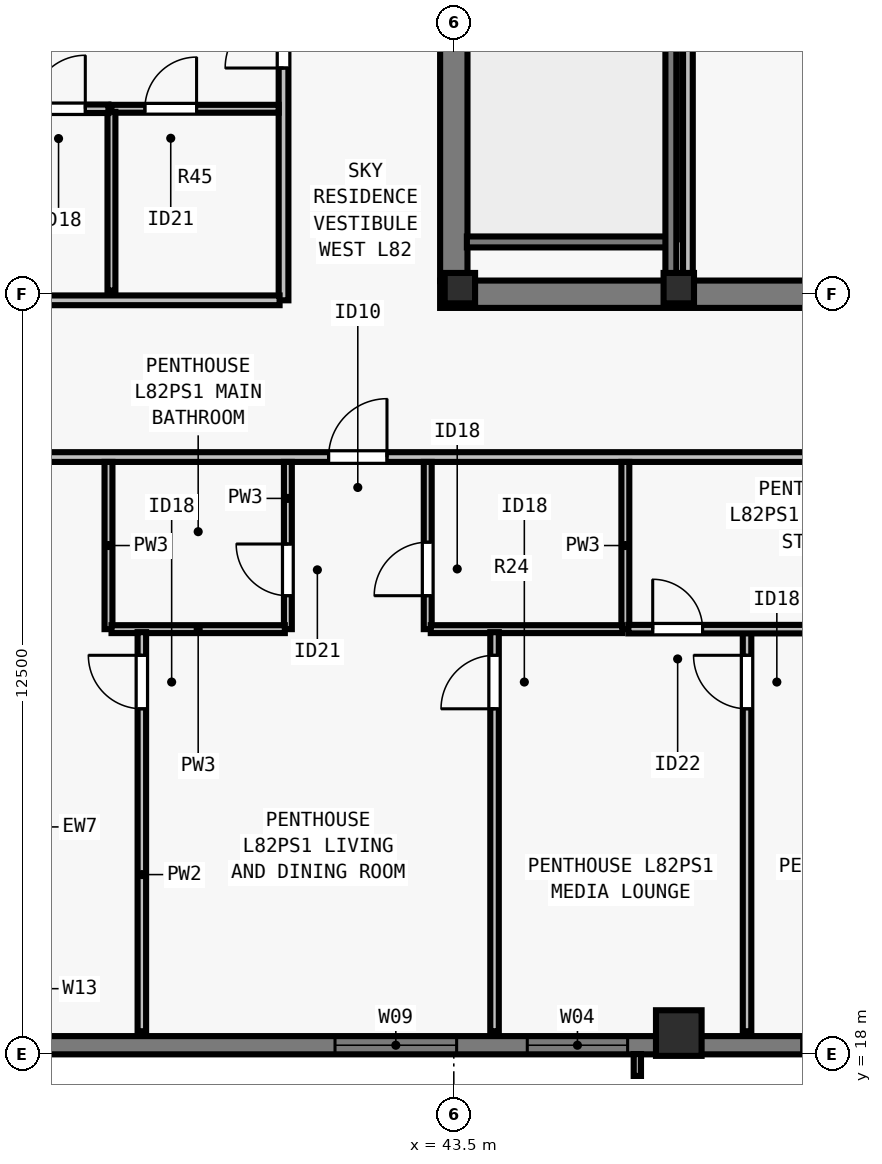
"""IFC4 building model, lengths in metres.
Left out: names, types, materials, properties, quantities, classifications, styles, units other than length and angle.
Written with IfcOpenShell. Run it as: python <this file> out.ifc"""

import sys

from ifc_helpers import new_model, si_unit, direction, frame, frame_2d, origin, origin_2d, place, context, subcontext, project, spatial, rectangle, i_section, extrude, element, fill, save


model = new_model("IFC4")
c1 = context("Model", 3, precision=1e-05, world=origin(), true_north=direction((0.0, 1.0)))
c2 = subcontext(c1, "Body", "Model", "MODEL_VIEW")
j1 = project(units=[si_unit("LENGTHUNIT", "METRE"), si_unit("PLANEANGLEUNIT", "RADIAN")], contexts=[c1])
p1 = place(None, origin())
s1 = spatial("IfcSite", under=j1, at=p1, CompositionType="ELEMENT")
p2 = place(p1, origin())
s2 = spatial("IfcBuilding", under=s1, at=p2, CompositionType="ELEMENT")
p3 = place(p2, frame((0.0, 0.0, 298.0)))
s3 = spatial("IfcBuildingStorey", under=s2, at=p3, CompositionType="ELEMENT", Elevation=298.0)
for number, where, z_axis, x_axis in (
    (1, (43.6, 30.6, 0.0), (0.0, 0.0, 1.0), (1.0, 0.0, 0.0)),
    (2, (47.2, 30.6, 0.0), (0.0, 0.0, 1.0), (1.0, 0.0, 0.0)),
):
    element("IfcColumn", number, at=place(p3, frame(where, z_axis=z_axis, x_axis=x_axis)), inside=s3, PredefinedType="COLUMN", context=c2, shape_type="SweptSolid", body=[
        extrude(i_section(OverallWidth=0.5, OverallDepth=0.5, WebThickness=0.028, FlangeThickness=0.045, at=origin_2d()), origin(), (0.0, 0.0, 1.0), 3.5),
    ])
p4 = place(p3, frame((47.2, 18.35, 0.0), z_axis=(0.0, 0.0, 1.0), x_axis=(1.0, 0.0, 0.0)))
e3 = element("IfcColumn", 3, at=p4, inside=s3, PredefinedType="COLUMN", context=c2, shape_type="SweptSolid", body=[
    extrude(rectangle(XDim=0.75, YDim=0.75, at=origin_2d()), origin(), (0.0, 0.0, 1.0), 3.5),
])
p5 = place(p3, frame((67.5, 18.15, 0.0), z_axis=(0.0, 0.0, 1.0), x_axis=(-1.0, 0.0, 0.0)))
e4 = element("IfcWall", 4, at=p5, inside=s3, PredefinedType="SOLIDWALL", context=c2, shape_type="SweptSolid", body=[
    extrude(rectangle(XDim=30.722, YDim=0.3, at=frame_2d((15.361, 0.0))), origin(), (0.0, 0.0, 1.0), 3.29),
])
p6 = place(p5, frame((4.944, 0.0, 0.8)))
e5 = element("IfcOpeningElement", 5, at=p6, cuts=e4, PredefinedType="OPENING", context=c2, shape_type="SweptSolid", body=[
    extrude(rectangle(XDim=1.65, YDim=1.758, at=frame_2d((0.825, 0.879))), frame((0.0, 0.16, 0.0), z_axis=(0.0, -1.0, 0.0), x_axis=(1.0, 0.0, 0.0)), (0.0, 0.0, 1.0), 0.32),
])
p7 = place(p5, frame((7.756, 0.0, 0.8)))
e6 = element("IfcOpeningElement", 6, at=p7, cuts=e4, PredefinedType="OPENING", context=c2, shape_type="SweptSolid", body=[
    extrude(rectangle(XDim=2.0, YDim=1.758, at=frame_2d((1.0, 0.879))), frame((0.0, 0.16, 0.0), z_axis=(0.0, -1.0, 0.0), x_axis=(1.0, 0.0, 0.0)), (0.0, 0.0, 1.0), 0.32),
])
p8 = place(p5, frame((12.617, 0.0, 0.8)))
e7 = element("IfcOpeningElement", 7, at=p8, cuts=e4, PredefinedType="OPENING", context=c2, shape_type="SweptSolid", body=[
    extrude(rectangle(XDim=1.65, YDim=1.758, at=frame_2d((0.825, 0.879))), frame((0.0, 0.16, 0.0), z_axis=(0.0, -1.0, 0.0), x_axis=(1.0, 0.0, 0.0)), (0.0, 0.0, 1.0), 0.32),
])
p9 = place(p5, frame((16.28, 0.0, 0.8)))
e8 = element("IfcOpeningElement", 8, at=p9, cuts=e4, PredefinedType="OPENING", context=c2, shape_type="SweptSolid", body=[
    extrude(rectangle(XDim=2.0, YDim=1.758, at=frame_2d((1.0, 0.879))), frame((0.0, 0.16, 0.0), z_axis=(0.0, -1.0, 0.0), x_axis=(1.0, 0.0, 0.0)), (0.0, 0.0, 1.0), 0.32),
])
p10 = place(p5, frame((21.142, 0.0, 0.8)))
e9 = element("IfcOpeningElement", 9, at=p10, cuts=e4, PredefinedType="OPENING", context=c2, shape_type="SweptSolid", body=[
    extrude(rectangle(XDim=1.65, YDim=1.758, at=frame_2d((0.825, 0.879))), frame((0.0, 0.16, 0.0), z_axis=(0.0, -1.0, 0.0), x_axis=(1.0, 0.0, 0.0)), (0.0, 0.0, 1.0), 0.32),
])
p11 = place(p5, frame((23.954, 0.0, 0.8)))
e10 = element("IfcOpeningElement", 10, at=p11, cuts=e4, PredefinedType="OPENING", context=c2, shape_type="SweptSolid", body=[
    extrude(rectangle(XDim=2.0, YDim=1.758, at=frame_2d((1.0, 0.879))), frame((0.0, 0.16, 0.0), z_axis=(0.0, -1.0, 0.0), x_axis=(1.0, 0.0, 0.0)), (0.0, 0.0, 1.0), 0.32),
])
p12 = place(p3, frame((43.275, 30.5, 0.0), z_axis=(0.0, 0.0, 1.0), x_axis=(1.0, 0.0, 0.0)))
e11 = element("IfcWall", 11, at=p12, inside=s3, PredefinedType="SHEAR", context=c2, shape_type="SweptSolid", body=[
    extrude(rectangle(XDim=17.45, YDim=0.45, at=frame_2d((8.725, 0.0))), origin(), (0.0, 0.0, 1.0), 3.29),
])
p13 = place(p3, frame((43.5, 30.715, 0.0), z_axis=(0.0, 0.0, 1.0), x_axis=(0.0, 1.0, 0.0)))
e12 = element("IfcWall", 12, at=p13, inside=s3, PredefinedType="SHEAR", context=c2, shape_type="SweptSolid", body=[
    extrude(rectangle(XDim=8.035, YDim=0.45, at=frame_2d((4.018, 0.0))), origin(), (0.0, 0.0, 1.0), 3.29),
])
p14 = place(p3, frame((47.35, 30.71, 0.0), z_axis=(0.0, 0.0, 1.0), x_axis=(0.0, 1.0, 0.0)))
e13 = element("IfcWall", 13, at=p14, inside=s3, PredefinedType="PARTITIONING", context=c2, shape_type="SweptSolid", body=[
    extrude(rectangle(XDim=7.905, YDim=0.16, at=frame_2d((3.953, 0.0))), origin(), (0.0, 0.0, 1.0), 3.29),
])
p15 = place(p3, frame((31.285, 27.823, 0.0), z_axis=(0.0, 0.0, 1.0), x_axis=(1.0, 0.0, 0.0)))
e14 = element("IfcWall", 14, at=p15, inside=s3, PredefinedType="PARTITIONING", context=c2, shape_type="SweptSolid", body=[
    extrude(rectangle(XDim=41.43, YDim=0.16, at=frame_2d((20.715, 0.0))), origin(), (0.0, 0.0, 1.0), 3.009),
])
p16 = place(p15, frame((10.156, 0.0, 0.0)))
e15 = element("IfcOpeningElement", 15, at=p16, cuts=e14, PredefinedType="OPENING", context=c2, shape_type="SweptSolid", body=[
    extrude(rectangle(XDim=0.96, YDim=2.18, at=frame_2d((0.48, 1.09))), frame((0.0, 0.09, 0.0), z_axis=(0.0, -1.0, 0.0), x_axis=(1.0, 0.0, 0.0)), (0.0, 0.0, 1.0), 0.18),
])
p17 = place(p15, frame((30.736, 0.0, 0.0)))
e16 = element("IfcOpeningElement", 16, at=p17, cuts=e14, PredefinedType="OPENING", context=c2, shape_type="SweptSolid", body=[
    extrude(rectangle(XDim=0.96, YDim=2.18, at=frame_2d((0.48, 1.09))), frame((0.0, 0.09, 0.0), z_axis=(0.0, -1.0, 0.0), x_axis=(1.0, 0.0, 0.0)), (0.0, 0.0, 1.0), 0.18),
])
p18 = place(p3, frame((40.7, 30.4, 0.0), z_axis=(0.0, 0.0, 1.0), x_axis=(0.0, 1.0, 0.0)))
e17 = element("IfcWall", 17, at=p18, inside=s3, PredefinedType="PARTITIONING", context=c2, shape_type="SweptSolid", body=[
    extrude(rectangle(XDim=17.2, YDim=0.16, at=frame_2d((8.6, 0.0))), origin(), (0.0, 0.0, 1.0), 3.009),
])
p19 = place(p18, frame((3.82, 0.0, 0.0)))
e18 = element("IfcOpeningElement", 18, at=p19, cuts=e17, PredefinedType="OPENING", context=c2, shape_type="SweptSolid", body=[
    extrude(rectangle(XDim=0.96, YDim=2.18, at=frame_2d((0.48, 1.09))), frame((0.0, 0.09, 0.0), z_axis=(0.0, -1.0, 0.0), x_axis=(1.0, 0.0, 0.0)), (0.0, 0.0, 1.0), 0.18),
])
p20 = place(p18, frame((12.42, 0.0, 0.0)))
e19 = element("IfcOpeningElement", 19, at=p20, cuts=e17, PredefinedType="OPENING", context=c2, shape_type="SweptSolid", body=[
    extrude(rectangle(XDim=0.96, YDim=2.18, at=frame_2d((0.48, 1.09))), frame((0.0, 0.09, 0.0), z_axis=(0.0, -1.0, 0.0), x_axis=(1.0, 0.0, 0.0)), (0.0, 0.0, 1.0), 0.18),
])
p21 = place(p3, frame((31.285, 30.4, 0.0), z_axis=(0.0, 0.0, 1.0), x_axis=(1.0, 0.0, 0.0)))
e20 = element("IfcWall", 20, at=p21, inside=s3, PredefinedType="PARTITIONING", context=c2, shape_type="SweptSolid", body=[
    extrude(rectangle(XDim=9.35, YDim=0.16, at=frame_2d((4.675, 0.0))), origin(), (0.0, 0.0, 1.0), 3.29),
])
p22 = place(p3, frame((37.821, 24.992, 0.0), z_axis=(0.0, 0.0, 1.0), x_axis=(0.0, 1.0, 0.0)))
e21 = element("IfcWall", 21, at=p22, inside=s3, PredefinedType="PLUMBINGWALL", context=c2, shape_type="SweptSolid", body=[
    extrude(rectangle(XDim=2.75, YDim=0.13, at=frame_2d((1.375, 0.0))), origin(), (0.0, 0.0, 1.0), 3.29),
])
p23 = place(p3, frame((40.771, 24.992, 0.0), z_axis=(0.0, 0.0, 1.0), x_axis=(0.0, 1.0, 0.0)))
e22 = element("IfcWall", 22, at=p23, inside=s3, PredefinedType="PLUMBINGWALL", context=c2, shape_type="SweptSolid", body=[
    extrude(rectangle(XDim=2.75, YDim=0.13, at=frame_2d((1.375, 0.0))), origin(), (0.0, 0.0, 1.0), 2.653),
])
p24 = place(p23, frame((0.55, 0.0, 0.0)))
e23 = element("IfcOpeningElement", 23, at=p24, cuts=e22, PredefinedType="OPENING", context=c2, shape_type="SweptSolid", body=[
    extrude(rectangle(XDim=0.85, YDim=2.08, at=frame_2d((0.425, 1.04))), frame((0.0, 0.075, 0.0), z_axis=(0.0, -1.0, 0.0), x_axis=(1.0, 0.0, 0.0)), (0.0, 0.0, 1.0), 0.15),
])
p25 = place(p3, frame((37.871, 24.992, 0.0), z_axis=(0.0, 0.0, 1.0), x_axis=(1.0, 0.0, 0.0)))
e24 = element("IfcWall", 24, at=p25, inside=s3, PredefinedType="PLUMBINGWALL", context=c2, shape_type="SweptSolid", body=[
    extrude(rectangle(XDim=2.85, YDim=0.13, at=frame_2d((1.425, 0.0))), origin(), (0.0, 0.0, 1.0), 3.29),
])
p26 = place(p3, frame((46.321, 24.992, 0.0), z_axis=(0.0, 0.0, 1.0), x_axis=(0.0, 1.0, 0.0)))
e25 = element("IfcWall", 25, at=p26, inside=s3, PredefinedType="PLUMBINGWALL", context=c2, shape_type="SweptSolid", body=[
    extrude(rectangle(XDim=2.75, YDim=0.13, at=frame_2d((1.375, 0.0))), origin(), (0.0, 0.0, 1.0), 3.29),
])
p27 = place(p3, frame((43.071, 24.992, 0.0), z_axis=(0.0, 0.0, 1.0), x_axis=(0.0, 1.0, 0.0)))
e26 = element("IfcWall", 26, at=p27, inside=s3, PredefinedType="PLUMBINGWALL", context=c2, shape_type="SweptSolid", body=[
    extrude(rectangle(XDim=2.75, YDim=0.13, at=frame_2d((1.375, 0.0))), origin(), (0.0, 0.0, 1.0), 3.29),
])
p28 = place(p27, frame((0.55, 0.0, 0.0)))
e27 = element("IfcOpeningElement", 27, at=p28, cuts=e26, PredefinedType="OPENING", context=c2, shape_type="SweptSolid", body=[
    extrude(rectangle(XDim=0.88, YDim=2.1, at=frame_2d((0.44, 1.05))), frame((0.0, 0.075, 0.0), z_axis=(0.0, -1.0, 0.0), x_axis=(1.0, 0.0, 0.0)), (0.0, 0.0, 1.0), 0.15),
])
p29 = place(p3, frame((43.121, 24.992, 0.0), z_axis=(0.0, 0.0, 1.0), x_axis=(1.0, 0.0, 0.0)))
e28 = element("IfcWall", 28, at=p29, inside=s3, PredefinedType="PLUMBINGWALL", context=c2, shape_type="SweptSolid", body=[
    extrude(rectangle(XDim=3.15, YDim=0.13, at=frame_2d((1.575, 0.0))), origin(), (0.0, 0.0, 1.0), 3.29),
])
p30 = place(p3, frame((38.37, 18.38, 0.0), z_axis=(0.0, 0.0, 1.0), x_axis=(0.0, 1.0, 0.0)))
e29 = element("IfcWall", 29, at=p30, inside=s3, PredefinedType="PARTITIONING", context=c2, shape_type="SweptSolid", body=[
    extrude(rectangle(XDim=6.562, YDim=0.14, at=frame_2d((3.281, 0.0))), origin(), (0.0, 0.0, 1.0), 2.653),
])
p31 = place(p30, frame((5.302, 0.0, 0.0)))
e30 = element("IfcOpeningElement", 30, at=p31, cuts=e29, PredefinedType="OPENING", context=c2, shape_type="SweptSolid", body=[
    extrude(rectangle(XDim=0.88, YDim=2.1, at=frame_2d((0.44, 1.05))), frame((0.0, 0.08, 0.0), z_axis=(0.0, -1.0, 0.0), x_axis=(1.0, 0.0, 0.0)), (0.0, 0.0, 1.0), 0.16),
])
p32 = place(p3, frame((48.323, 18.38, 0.0), z_axis=(0.0, 0.0, 1.0), x_axis=(0.0, 1.0, 0.0)))
e31 = element("IfcWall", 31, at=p32, inside=s3, PredefinedType="PARTITIONING", context=c2, shape_type="SweptSolid", body=[
    extrude(rectangle(XDim=6.653, YDim=0.14, at=frame_2d((3.326, 0.0))), origin(), (0.0, 0.0, 1.0), 3.009),
])
p33 = place(p32, frame((5.302, 0.0, 0.0)))
e32 = element("IfcOpeningElement", 32, at=p33, cuts=e31, PredefinedType="OPENING", context=c2, shape_type="SweptSolid", body=[
    extrude(rectangle(XDim=0.88, YDim=2.1, at=frame_2d((0.44, 1.05))), frame((0.0, 0.08, 0.0), z_axis=(0.0, -1.0, 0.0), x_axis=(1.0, 0.0, 0.0)), (0.0, 0.0, 1.0), 0.16),
])
p34 = place(p3, frame((46.371, 24.992, 0.0), z_axis=(0.0, 0.0, 1.0), x_axis=(1.0, 0.0, 0.0)))
e33 = element("IfcWall", 33, at=p34, inside=s3, PredefinedType="PARTITIONING", context=c2, shape_type="SweptSolid", body=[
    extrude(rectangle(XDim=6.101, YDim=0.14, at=frame_2d((3.051, 0.0))), origin(), (0.0, 0.0, 1.0), 3.29),
])
p35 = place(p34, frame((0.4, 0.0, 0.0)))
e34 = element("IfcOpeningElement", 34, at=p35, cuts=e33, PredefinedType="OPENING", context=c2, shape_type="SweptSolid", body=[
    extrude(rectangle(XDim=0.82, YDim=2.1, at=frame_2d((0.41, 1.05))), frame((0.0, 0.08, 0.0), z_axis=(0.0, -1.0, 0.0), x_axis=(1.0, 0.0, 0.0)), (0.0, 0.0, 1.0), 0.16),
])
p36 = place(p3, frame((44.17, 18.38, 0.0), z_axis=(0.0, 0.0, 1.0), x_axis=(0.0, 1.0, 0.0)))
e35 = element("IfcWall", 35, at=p36, inside=s3, PredefinedType="PARTITIONING", context=c2, shape_type="SweptSolid", body=[
    extrude(rectangle(XDim=6.562, YDim=0.14, at=frame_2d((3.281, 0.0))), origin(), (0.0, 0.0, 1.0), 3.29),
])
p37 = place(p36, frame((5.302, 0.0, 0.0)))
e36 = element("IfcOpeningElement", 36, at=p37, cuts=e35, PredefinedType="OPENING", context=c2, shape_type="SweptSolid", body=[
    extrude(rectangle(XDim=0.88, YDim=2.1, at=frame_2d((0.44, 1.05))), frame((0.0, 0.08, 0.0), z_axis=(0.0, -1.0, 0.0), x_axis=(1.0, 0.0, 0.0)), (0.0, 0.0, 1.0), 0.16),
])
p38 = place(p3, frame((37.87, 33.55, 0.0), z_axis=(0.0, 0.0, 1.0), x_axis=(1.0, 0.0, 0.0)))
e37 = element("IfcWall", 37, at=p38, inside=s3, PredefinedType="PLUMBINGWALL", context=c2, shape_type="SweptSolid", body=[
    extrude(rectangle(XDim=2.75, YDim=0.13, at=frame_2d((1.375, 0.0))), origin(), (0.0, 0.0, 1.0), 3.29),
])
p39 = place(p38, frame((0.55, 0.0, 0.0)))
e38 = element("IfcOpeningElement", 38, at=p39, cuts=e37, PredefinedType="OPENING", context=c2, shape_type="SweptSolid", body=[
    extrude(rectangle(XDim=0.85, YDim=2.08, at=frame_2d((0.425, 1.04))), frame((0.0, 0.075, 0.0), z_axis=(0.0, -1.0, 0.0), x_axis=(1.0, 0.0, 0.0)), (0.0, 0.0, 1.0), 0.15),
])
p40 = place(p3, frame((37.87, 30.56, 0.0), z_axis=(0.0, 0.0, 1.0), x_axis=(0.0, 1.0, 0.0)))
e39 = element("IfcWall", 39, at=p40, inside=s3, PredefinedType="PLUMBINGWALL", context=c2, shape_type="SweptSolid", body=[
    extrude(rectangle(XDim=2.94, YDim=0.13, at=frame_2d((1.47, 0.0))), origin(), (0.0, 0.0, 1.0), 3.29),
])
p41 = place(p3, frame((31.38, 33.55, 0.0), z_axis=(0.0, 0.0, 1.0), x_axis=(1.0, 0.0, 0.0)))
e40 = element("IfcWall", 40, at=p41, inside=s3, PredefinedType="PARTITIONING", context=c2, shape_type="SweptSolid", body=[
    extrude(rectangle(XDim=6.44, YDim=0.14, at=frame_2d((3.22, 0.0))), origin(), (0.0, 0.0, 1.0), 2.653),
])
p42 = place(p41, frame((5.18, 0.0, 0.0)))
e41 = element("IfcOpeningElement", 41, at=p42, cuts=e40, PredefinedType="OPENING", context=c2, shape_type="SweptSolid", body=[
    extrude(rectangle(XDim=0.88, YDim=2.1, at=frame_2d((0.44, 1.05))), frame((0.0, 0.08, 0.0), z_axis=(0.0, -1.0, 0.0), x_axis=(1.0, 0.0, 0.0)), (0.0, 0.0, 1.0), 0.16),
])
p43 = place(p3, frame((43.715, 31.36, 0.0), z_axis=(0.0, 0.0, 1.0), x_axis=(1.0, 0.0, 0.0)))
e42 = element("IfcWall", 42, at=p43, inside=s3, PredefinedType="SOLIDWALL", context=c2, shape_type="SweptSolid", body=[
    extrude(rectangle(XDim=3.28, YDim=0.18, at=frame_2d((1.64, 0.0))), origin(), (0.0, 0.0, 1.0), 3.29),
])
p44 = place(p3, frame((47.07, 38.78, 0.0), z_axis=(0.0, 0.0, 1.0), x_axis=(0.0, -1.0, 0.0)))
e43 = element("IfcWall", 43, at=p44, inside=s3, PredefinedType="SOLIDWALL", context=c2, shape_type="SweptSolid", body=[
    extrude(rectangle(XDim=8.067, YDim=0.18, at=frame_2d((4.034, 0.0))), origin(), (0.0, 0.0, 1.0), 3.29),
])
p45 = place(p9, origin())
e44 = element("IfcWindow", 44, at=p45, inside=s3, PartitioningType="SINGLE_PANEL", PredefinedType="WINDOW", context=c2, shape_type="SweptSolid", body=[
    extrude(rectangle(XDim=2.0, YDim=1.758, at=frame_2d((1.0, 0.879))), frame((0.0, -0.05, 0.0), z_axis=(0.0, -1.0, 0.0), x_axis=(1.0, 0.0, 0.0)), (0.0, 0.0, 1.0), 0.06),
])
fill(e8, e44)
p46 = place(p10, origin())
e45 = element("IfcWindow", 45, at=p46, inside=s3, PartitioningType="SINGLE_PANEL", PredefinedType="WINDOW", context=c2, shape_type="SweptSolid", body=[
    extrude(rectangle(XDim=1.65, YDim=1.758, at=frame_2d((0.825, 0.879))), frame((0.0, -0.05, 0.0), z_axis=(0.0, -1.0, 0.0), x_axis=(1.0, 0.0, 0.0)), (0.0, 0.0, 1.0), 0.06),
])
fill(e9, e45)
p47 = place(p11, origin())
e46 = element("IfcWindow", 46, at=p47, inside=s3, PartitioningType="SINGLE_PANEL", PredefinedType="WINDOW", context=c2, shape_type="SweptSolid", body=[
    extrude(rectangle(XDim=2.0, YDim=1.758, at=frame_2d((1.0, 0.879))), frame((0.0, -0.05, 0.0), z_axis=(0.0, -1.0, 0.0), x_axis=(1.0, 0.0, 0.0)), (0.0, 0.0, 1.0), 0.06),
])
fill(e10, e46)
p48 = place(p24, origin())
e47 = element("IfcDoor", 47, at=p48, inside=s3, OperationType="SINGLE_SWING_RIGHT", PredefinedType="DOOR", context=c2, shape_type="SweptSolid", body=[
    extrude(rectangle(XDim=0.85, YDim=2.08, at=frame_2d((0.425, 1.04))), frame((0.0, 0.025, 0.0), z_axis=(0.0, -1.0, 0.0), x_axis=(1.0, 0.0, 0.0)), (0.0, 0.0, 1.0), 0.05),
])
fill(e23, e47)
p49 = place(p28, origin())
e48 = element("IfcDoor", 48, at=p49, inside=s3, OperationType="SINGLE_SWING_LEFT", PredefinedType="DOOR", context=c2, shape_type="SweptSolid", body=[
    extrude(rectangle(XDim=0.88, YDim=2.1, at=frame_2d((0.44, 1.05))), frame((0.0, 0.025, 0.0), z_axis=(0.0, -1.0, 0.0), x_axis=(1.0, 0.0, 0.0)), (0.0, 0.0, 1.0), 0.05),
])
fill(e27, e48)
p50 = place(p31, origin())
e49 = element("IfcDoor", 49, at=p50, inside=s3, OperationType="SINGLE_SWING_RIGHT", PredefinedType="DOOR", context=c2, shape_type="SweptSolid", body=[
    extrude(rectangle(XDim=0.88, YDim=2.1, at=frame_2d((0.44, 1.05))), frame((0.0, 0.025, 0.0), z_axis=(0.0, -1.0, 0.0), x_axis=(1.0, 0.0, 0.0)), (0.0, 0.0, 1.0), 0.05),
])
fill(e30, e49)
p51 = place(p35, origin())
e50 = element("IfcDoor", 50, at=p51, inside=s3, OperationType="SINGLE_SWING_LEFT", PredefinedType="DOOR", context=c2, shape_type="SweptSolid", body=[
    extrude(rectangle(XDim=0.82, YDim=2.1, at=frame_2d((0.41, 1.05))), frame((0.0, 0.025, 0.0), z_axis=(0.0, -1.0, 0.0), x_axis=(1.0, 0.0, 0.0)), (0.0, 0.0, 1.0), 0.05),
])
fill(e34, e50)
p52 = place(p33, origin())
e51 = element("IfcDoor", 51, at=p52, inside=s3, OperationType="SINGLE_SWING_RIGHT", PredefinedType="DOOR", context=c2, shape_type="SweptSolid", body=[
    extrude(rectangle(XDim=0.88, YDim=2.1, at=frame_2d((0.44, 1.05))), frame((0.0, 0.025, 0.0), z_axis=(0.0, -1.0, 0.0), x_axis=(1.0, 0.0, 0.0)), (0.0, 0.0, 1.0), 0.05),
])
fill(e32, e51)
p53 = place(p37, origin())
e52 = element("IfcDoor", 52, at=p53, inside=s3, OperationType="SINGLE_SWING_LEFT", PredefinedType="DOOR", context=c2, shape_type="SweptSolid", body=[
    extrude(rectangle(XDim=0.88, YDim=2.1, at=frame_2d((0.44, 1.05))), frame((0.0, 0.025, 0.0), z_axis=(0.0, -1.0, 0.0), x_axis=(1.0, 0.0, 0.0)), (0.0, 0.0, 1.0), 0.05),
])
fill(e36, e52)
p54 = place(p16, origin())
e53 = element("IfcDoor", 53, at=p54, inside=s3, OperationType="SINGLE_SWING_RIGHT", PredefinedType="DOOR", context=c2, shape_type="SweptSolid", body=[
    extrude(rectangle(XDim=0.96, YDim=2.18, at=frame_2d((0.48, 1.09))), frame((0.0, 0.025, 0.0), z_axis=(0.0, -1.0, 0.0), x_axis=(1.0, 0.0, 0.0)), (0.0, 0.0, 1.0), 0.05),
])
fill(e15, e53)
p55 = place(p39, origin())
e54 = element("IfcDoor", 54, at=p55, inside=s3, OperationType="SINGLE_SWING_RIGHT", PredefinedType="DOOR", context=c2, shape_type="SweptSolid", body=[
    extrude(rectangle(XDim=0.85, YDim=2.08, at=frame_2d((0.425, 1.04))), frame((0.0, 0.025, 0.0), z_axis=(0.0, -1.0, 0.0), x_axis=(1.0, 0.0, 0.0)), (0.0, 0.0, 1.0), 0.05),
])
fill(e38, e54)
p56 = place(p42, origin())
e55 = element("IfcDoor", 55, at=p56, inside=s3, OperationType="SINGLE_SWING_RIGHT", PredefinedType="DOOR", context=c2, shape_type="SweptSolid", body=[
    extrude(rectangle(XDim=0.88, YDim=2.1, at=frame_2d((0.44, 1.05))), frame((0.0, 0.025, 0.0), z_axis=(0.0, -1.0, 0.0), x_axis=(1.0, 0.0, 0.0)), (0.0, 0.0, 1.0), 0.05),
])
fill(e41, e55)
p57 = place(p19, origin())
e56 = element("IfcDoor", 56, at=p57, inside=s3, OperationType="SINGLE_SWING_LEFT", PredefinedType="DOOR", context=c2, shape_type="SweptSolid", body=[
    extrude(rectangle(XDim=0.96, YDim=2.18, at=frame_2d((0.48, 1.09))), frame((0.0, 0.025, 0.0), z_axis=(0.0, -1.0, 0.0), x_axis=(1.0, 0.0, 0.0)), (0.0, 0.0, 1.0), 0.05),
])
fill(e18, e56)
save(model, sys.argv[1])
